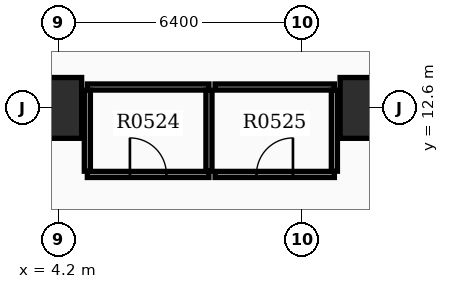
"""IFC4 building model, lengths in metres.
Left out: names, types, materials, properties, quantities, classifications, styles, units other than length and angle.
Written with IfcOpenShell. Run it as: python <this file> out.ifc"""

import sys

from ifc_helpers import new_model, si_unit, direction, frame, frame_2d, origin, origin_2d, place, context, subcontext, project, spatial, rectangle, extrude, element, fill, save


model = new_model("IFC4")
c1 = context("Model", 3, precision=1e-05, world=origin(), true_north=direction((0.0, 1.0)))
c2 = subcontext(c1, "Body", "Model", "MODEL_VIEW")
j1 = project(units=[si_unit("LENGTHUNIT", "METRE"), si_unit("PLANEANGLEUNIT", "RADIAN")], contexts=[c1])
p1 = place(None, origin())
s1 = spatial("IfcSite", under=j1, at=p1, CompositionType="ELEMENT")
p2 = place(p1, origin())
s2 = spatial("IfcBuilding", under=s1, at=p2, CompositionType="ELEMENT")
p3 = place(p2, frame((0.0, 0.0, 35.4)))
s3 = spatial("IfcBuildingStorey", under=s2, at=p3, CompositionType="ELEMENT", Elevation=35.4)
for number, where, z_axis, x_axis in (
    (1, (12.4, 12.6, 0.0), (0.0, 0.0, 1.0), (1.0, 0.0, 0.0)),
    (2, (4.0, 12.6, 0.0), (0.0, 0.0, 1.0), (1.0, 0.0, 0.0)),
):
    element("IfcColumn", number, at=place(p3, frame(where, z_axis=z_axis, x_axis=x_axis)), inside=s3, PredefinedType="COLUMN", context=c2, shape_type="SweptSolid", body=[
        extrude(rectangle(XDim=1.6, YDim=1.6, at=origin_2d()), origin(), (0.0, 0.0, 1.0), 3.9),
    ])
p4 = place(p3, frame((4.95, 10.85, 0.0), z_axis=(0.0, 0.0, 1.0), x_axis=(1.0, 0.0, 0.0)))
e3 = element("IfcWall", 3, at=p4, inside=s3, PredefinedType="PARTITIONING", context=c2, shape_type="SweptSolid", body=[
    extrude(rectangle(XDim=3.2, YDim=0.16, at=frame_2d((1.6, 0.0))), origin(), (0.0, 0.0, 1.0), 2.9),
])
p5 = place(p4, frame((1.12, 0.0, 0.0)))
e4 = element("IfcOpeningElement", 4, at=p5, cuts=e3, PredefinedType="OPENING", context=c2, shape_type="SweptSolid", body=[
    extrude(rectangle(XDim=0.96, YDim=2.15, at=frame_2d((0.48, 1.075))), frame((0.0, 0.09, 0.0), z_axis=(0.0, -1.0, 0.0), x_axis=(1.0, 0.0, 0.0)), (0.0, 0.0, 1.0), 0.18),
])
p6 = place(p3, frame((4.95, 13.15, 0.0), z_axis=(0.0, 0.0, 1.0), x_axis=(1.0, 0.0, 0.0)))
e5 = element("IfcWall", 5, at=p6, inside=s3, PredefinedType="PARTITIONING", context=c2, shape_type="SweptSolid", body=[
    extrude(rectangle(XDim=3.2, YDim=0.16, at=frame_2d((1.6, 0.0))), origin(), (0.0, 0.0, 1.0), 2.9),
])
for number, where, z_axis, x_axis in (
    (6, (4.95, 10.935, 0.0), (0.0, 0.0, 1.0), (0.0, 1.0, 0.0)),
    (7, (8.15, 10.935, 0.0), (0.0, 0.0, 1.0), (0.0, 1.0, 0.0)),
):
    element("IfcWall", number, at=place(p3, frame(where, z_axis=z_axis, x_axis=x_axis)), inside=s3, PredefinedType="PARTITIONING", context=c2, shape_type="SweptSolid", body=[
        extrude(rectangle(XDim=2.13, YDim=0.16, at=frame_2d((1.065, 0.0))), origin(), (0.0, 0.0, 1.0), 2.9),
    ])
p7 = place(p3, frame((8.31, 10.85, 0.0), z_axis=(0.0, 0.0, 1.0), x_axis=(1.0, 0.0, 0.0)))
e8 = element("IfcWall", 8, at=p7, inside=s3, PredefinedType="PARTITIONING", context=c2, shape_type="SweptSolid", body=[
    extrude(rectangle(XDim=3.14, YDim=0.16, at=frame_2d((1.57, 0.0))), origin(), (0.0, 0.0, 1.0), 2.9),
])
p8 = place(p7, frame((1.09, 0.0, 0.0)))
e9 = element("IfcOpeningElement", 9, at=p8, cuts=e8, PredefinedType="OPENING", context=c2, shape_type="SweptSolid", body=[
    extrude(rectangle(XDim=0.96, YDim=2.15, at=frame_2d((0.48, 1.075))), frame((0.0, 0.09, 0.0), z_axis=(0.0, -1.0, 0.0), x_axis=(1.0, 0.0, 0.0)), (0.0, 0.0, 1.0), 0.18),
])
p9 = place(p3, frame((8.31, 13.15, 0.0), z_axis=(0.0, 0.0, 1.0), x_axis=(1.0, 0.0, 0.0)))
e10 = element("IfcWall", 10, at=p9, inside=s3, PredefinedType="PARTITIONING", context=c2, shape_type="SweptSolid", body=[
    extrude(rectangle(XDim=3.14, YDim=0.16, at=frame_2d((1.57, 0.0))), origin(), (0.0, 0.0, 1.0), 2.9),
])
p10 = place(p3, frame((11.45, 10.935, 0.0), z_axis=(0.0, 0.0, 1.0), x_axis=(0.0, 1.0, 0.0)))
e11 = element("IfcWall", 11, at=p10, inside=s3, PredefinedType="PARTITIONING", context=c2, shape_type="SweptSolid", body=[
    extrude(rectangle(XDim=2.13, YDim=0.16, at=frame_2d((1.065, 0.0))), origin(), (0.0, 0.0, 1.0), 2.9),
])
p11 = place(p5, origin())
e12 = element("IfcDoor", 12, at=p11, inside=s3, OperationType="SINGLE_SWING_LEFT", PredefinedType="DOOR", context=c2, shape_type="SweptSolid", body=[
    extrude(rectangle(XDim=0.96, YDim=2.15, at=frame_2d((0.48, 1.075))), frame((0.0, 0.025, 0.0), z_axis=(0.0, -1.0, 0.0), x_axis=(1.0, 0.0, 0.0)), (0.0, 0.0, 1.0), 0.05),
])
fill(e4, e12)
p12 = place(p8, origin())
e13 = element("IfcDoor", 13, at=p12, inside=s3, OperationType="SINGLE_SWING_RIGHT", PredefinedType="DOOR", context=c2, shape_type="SweptSolid", body=[
    extrude(rectangle(XDim=0.96, YDim=2.15, at=frame_2d((0.48, 1.075))), frame((0.0, 0.025, 0.0), z_axis=(0.0, -1.0, 0.0), x_axis=(1.0, 0.0, 0.0)), (0.0, 0.0, 1.0), 0.05),
])
fill(e9, e13)
save(model, sys.argv[1])
